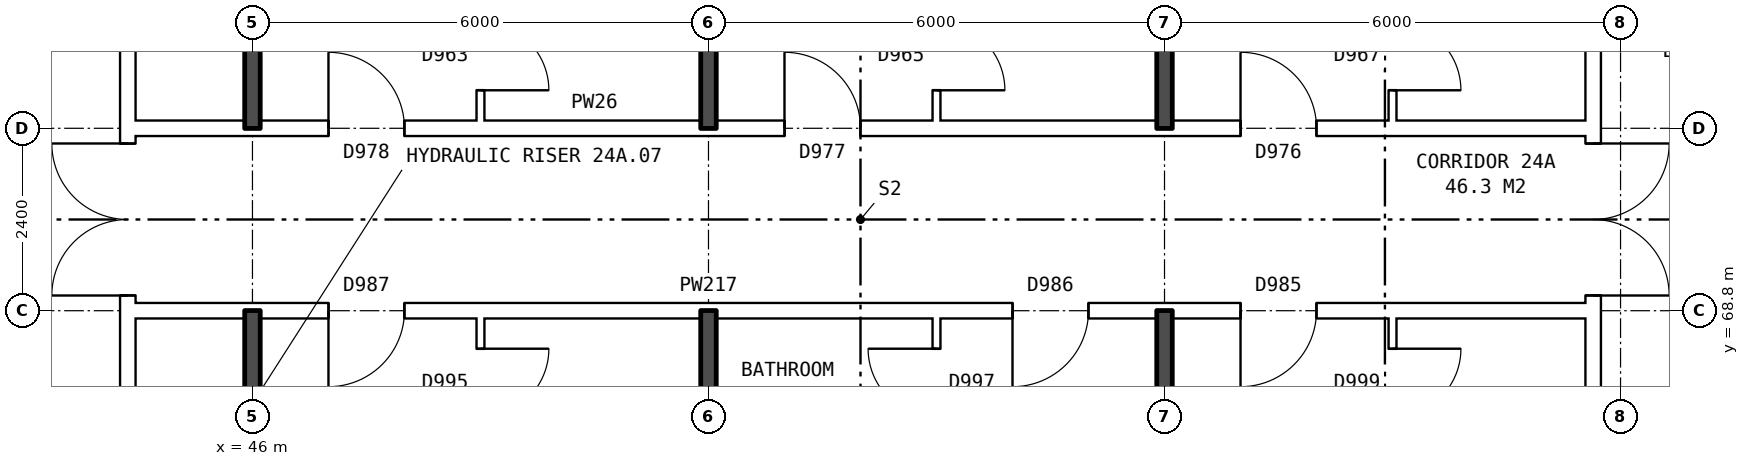
"""IFC4 building model, lengths in metres.
Left out: names, types, materials, properties, quantities, classifications, styles, units other than length and angle.
Written with IfcOpenShell. Run it as: python <this file> out.ifc"""

import sys

from ifc_helpers import new_model, si_unit, direction, frame, frame_2d, origin, place, context, subcontext, project, spatial, rectangle, extrude, element, fill, save


model = new_model("IFC4")
c1 = context("Model", 3, precision=1e-05, world=origin(), true_north=direction((0.0, 1.0)))
c2 = subcontext(c1, "Body", "Model", "MODEL_VIEW")
j1 = project(units=[si_unit("LENGTHUNIT", "METRE"), si_unit("PLANEANGLEUNIT", "RADIAN")], contexts=[c1])
p1 = place(None, origin())
s1 = spatial("IfcSite", under=j1, at=p1, CompositionType="ELEMENT")
p2 = place(p1, origin())
s2 = spatial("IfcBuilding", under=s1, at=p2, CompositionType="ELEMENT")
p3 = place(p2, frame((0.0, 0.0, 87.1)))
s3 = spatial("IfcBuildingStorey", under=s2, at=p3, CompositionType="ELEMENT", Elevation=87.1)
p4 = place(p3, frame((63.64, 63.9, 0.0), z_axis=(0.0, 0.0, 1.0), x_axis=(0.0, 1.0, 0.0)))
e1 = element("IfcWall", 1, at=p4, inside=s3, PredefinedType="PARTITIONING", context=c2, shape_type="SweptSolid", body=[
    extrude(rectangle(XDim=12.2, YDim=0.2, at=frame_2d((6.1, 0.0))), origin(), (0.0, 0.0, 1.0), 2.85),
])
p5 = place(p4, frame((5.1, 0.0, 0.0)))
e2 = element("IfcOpeningElement", 2, at=p5, cuts=e1, PredefinedType="OPENING", context=c2, shape_type="SweptSolid", body=[
    extrude(rectangle(XDim=2.0, YDim=2.1, at=frame_2d((1.0, 1.05))), frame((0.0, 0.11, 0.0), z_axis=(0.0, -1.0, 0.0), x_axis=(1.0, 0.0, 0.0)), (0.0, 0.0, 1.0), 0.22),
])
p6 = place(p3, frame((44.36, 63.9, 0.0), z_axis=(0.0, 0.0, 1.0), x_axis=(0.0, 1.0, 0.0)))
e3 = element("IfcWall", 3, at=p6, inside=s3, PredefinedType="PARTITIONING", context=c2, shape_type="SweptSolid", body=[
    extrude(rectangle(XDim=12.2, YDim=0.2, at=frame_2d((6.1, 0.0))), origin(), (0.0, 0.0, 1.0), 2.85),
])
p7 = place(p6, frame((5.1, 0.0, 0.0)))
e4 = element("IfcOpeningElement", 4, at=p7, cuts=e3, PredefinedType="OPENING", context=c2, shape_type="SweptSolid", body=[
    extrude(rectangle(XDim=2.0, YDim=2.1, at=frame_2d((1.0, 1.05))), frame((0.0, 0.11, 0.0), z_axis=(0.0, -1.0, 0.0), x_axis=(1.0, 0.0, 0.0)), (0.0, 0.0, 1.0), 0.22),
])
p8 = place(p3, frame((44.36, 68.8, 0.0), z_axis=(0.0, 0.0, 1.0), x_axis=(1.0, 0.0, 0.0)))
e5 = element("IfcWall", 5, at=p8, inside=s3, PredefinedType="PARTITIONING", context=c2, shape_type="SweptSolid", body=[
    extrude(rectangle(XDim=19.28, YDim=0.2, at=frame_2d((9.64, 0.0))), origin(), (0.0, 0.0, 1.0), 2.85),
])
p9 = place(p8, frame((14.64, 0.0, 0.0)))
e6 = element("IfcOpeningElement", 6, at=p9, cuts=e5, PredefinedType="OPENING", context=c2, shape_type="SweptSolid", body=[
    extrude(rectangle(XDim=1.0, YDim=2.1, at=frame_2d((0.5, 1.05))), frame((0.0, 0.11, 0.0), z_axis=(0.0, -1.0, 0.0), x_axis=(1.0, 0.0, 0.0)), (0.0, 0.0, 1.0), 0.22),
])
p10 = place(p8, frame((11.64, 0.0, 0.0)))
e7 = element("IfcOpeningElement", 7, at=p10, cuts=e5, PredefinedType="OPENING", context=c2, shape_type="SweptSolid", body=[
    extrude(rectangle(XDim=1.0, YDim=2.1, at=frame_2d((0.5, 1.05))), frame((0.0, 0.11, 0.0), z_axis=(0.0, -1.0, 0.0), x_axis=(1.0, 0.0, 0.0)), (0.0, 0.0, 1.0), 0.22),
])
p11 = place(p8, frame((2.64, 0.0, 0.0)))
e8 = element("IfcOpeningElement", 8, at=p11, cuts=e5, PredefinedType="OPENING", context=c2, shape_type="SweptSolid", body=[
    extrude(rectangle(XDim=1.0, YDim=2.1, at=frame_2d((0.5, 1.05))), frame((0.0, 0.11, 0.0), z_axis=(0.0, -1.0, 0.0), x_axis=(1.0, 0.0, 0.0)), (0.0, 0.0, 1.0), 0.22),
])
p12 = place(p3, frame((44.36, 71.2, 0.0), z_axis=(0.0, 0.0, 1.0), x_axis=(1.0, 0.0, 0.0)))
e9 = element("IfcWall", 9, at=p12, inside=s3, PredefinedType="PARTITIONING", context=c2, shape_type="SweptSolid", body=[
    extrude(rectangle(XDim=19.28, YDim=0.2, at=frame_2d((9.64, 0.0))), origin(), (0.0, 0.0, 1.0), 2.85),
])
p13 = place(p12, frame((14.64, 0.0, 0.0)))
e10 = element("IfcOpeningElement", 10, at=p13, cuts=e9, PredefinedType="OPENING", context=c2, shape_type="SweptSolid", body=[
    extrude(rectangle(XDim=1.0, YDim=2.1, at=frame_2d((0.5, 1.05))), frame((0.0, 0.11, 0.0), z_axis=(0.0, -1.0, 0.0), x_axis=(1.0, 0.0, 0.0)), (0.0, 0.0, 1.0), 0.22),
])
p14 = place(p12, frame((8.64, 0.0, 0.0)))
e11 = element("IfcOpeningElement", 11, at=p14, cuts=e9, PredefinedType="OPENING", context=c2, shape_type="SweptSolid", body=[
    extrude(rectangle(XDim=1.0, YDim=2.1, at=frame_2d((0.5, 1.05))), frame((0.0, 0.11, 0.0), z_axis=(0.0, -1.0, 0.0), x_axis=(1.0, 0.0, 0.0)), (0.0, 0.0, 1.0), 0.22),
])
p15 = place(p12, frame((2.64, 0.0, 0.0)))
e12 = element("IfcOpeningElement", 12, at=p15, cuts=e9, PredefinedType="OPENING", context=c2, shape_type="SweptSolid", body=[
    extrude(rectangle(XDim=1.0, YDim=2.1, at=frame_2d((0.5, 1.05))), frame((0.0, 0.11, 0.0), z_axis=(0.0, -1.0, 0.0), x_axis=(1.0, 0.0, 0.0)), (0.0, 0.0, 1.0), 0.22),
])
for number, where, z_axis, x_axis in (
    (13, (46.0, 63.8, 0.0), (0.0, 0.0, 1.0), (0.0, 1.0, 0.0)),
    (14, (46.0, 71.2, 0.0), (0.0, 0.0, 1.0), (0.0, 1.0, 0.0)),
):
    element("IfcWall", number, at=place(p3, frame(where, z_axis=z_axis, x_axis=x_axis)), inside=s3, PredefinedType="SOLIDWALL", context=c2, shape_type="SweptSolid", body=[
        extrude(rectangle(XDim=5.0, YDim=0.2, at=frame_2d((2.5, 0.0))), origin(), (0.0, 0.0, 1.0), 2.85),
    ])
p16 = place(p3, frame((49.0, 54.36, 0.0), z_axis=(0.0, 0.0, 1.0), x_axis=(0.0, 1.0, 0.0)))
e15 = element("IfcWall", 15, at=p16, inside=s3, PredefinedType="PARTITIONING", context=c2, shape_type="SweptSolid", body=[
    extrude(rectangle(XDim=14.34, YDim=0.1, at=frame_2d((7.17, 0.0))), origin(), (0.0, 0.0, 1.0), 2.85),
])
p17 = place(p16, frame((5.5, 0.0, 0.0)))
e16 = element("IfcOpeningElement", 16, at=p17, cuts=e15, PredefinedType="OPENING", context=c2, shape_type="SweptSolid", body=[
    extrude(rectangle(XDim=0.9, YDim=2.1, at=frame_2d((0.45, 1.05))), frame((0.0, 0.06, 0.0), z_axis=(0.0, -1.0, 0.0), x_axis=(1.0, 0.0, 0.0)), (0.0, 0.0, 1.0), 0.12),
])
p18 = place(p16, frame((13.04, 0.0, 0.0)))
e17 = element("IfcOpeningElement", 17, at=p18, cuts=e15, PredefinedType="OPENING", context=c2, shape_type="SweptSolid", body=[
    extrude(rectangle(XDim=0.9, YDim=2.1, at=frame_2d((0.45, 1.05))), frame((0.0, 0.06, 0.0), z_axis=(0.0, -1.0, 0.0), x_axis=(1.0, 0.0, 0.0)), (0.0, 0.0, 1.0), 0.12),
])
p19 = place(p3, frame((49.0, 71.3, 0.0), z_axis=(0.0, 0.0, 1.0), x_axis=(0.0, 1.0, 0.0)))
e18 = element("IfcWall", 18, at=p19, inside=s3, PredefinedType="PARTITIONING", context=c2, shape_type="SweptSolid", body=[
    extrude(rectangle(XDim=14.34, YDim=0.1, at=frame_2d((7.17, 0.0))), origin(), (0.0, 0.0, 1.0), 2.85),
])
p20 = place(p19, frame((7.94, 0.0, 0.0)))
e19 = element("IfcOpeningElement", 19, at=p20, cuts=e18, PredefinedType="OPENING", context=c2, shape_type="SweptSolid", body=[
    extrude(rectangle(XDim=0.9, YDim=2.1, at=frame_2d((0.45, 1.05))), frame((0.0, 0.06, 0.0), z_axis=(0.0, -1.0, 0.0), x_axis=(1.0, 0.0, 0.0)), (0.0, 0.0, 1.0), 0.12),
])
p21 = place(p19, frame((0.4, 0.0, 0.0)))
e20 = element("IfcOpeningElement", 20, at=p21, cuts=e18, PredefinedType="OPENING", context=c2, shape_type="SweptSolid", body=[
    extrude(rectangle(XDim=0.9, YDim=2.1, at=frame_2d((0.45, 1.05))), frame((0.0, 0.06, 0.0), z_axis=(0.0, -1.0, 0.0), x_axis=(1.0, 0.0, 0.0)), (0.0, 0.0, 1.0), 0.12),
])
for number, where, z_axis, x_axis in (
    (21, (52.0, 54.36, 0.0), (0.0, 0.0, 1.0), (0.0, 1.0, 0.0)),
    (22, (52.0, 71.2, 0.0), (0.0, 0.0, 1.0), (0.0, 1.0, 0.0)),
):
    element("IfcWall", number, at=place(p3, frame(where, z_axis=z_axis, x_axis=x_axis)), inside=s3, PredefinedType="SOLIDWALL", context=c2, shape_type="SweptSolid", body=[
        extrude(rectangle(XDim=14.44, YDim=0.2, at=frame_2d((7.22, 0.0))), origin(), (0.0, 0.0, 1.0), 2.85),
    ])
p22 = place(p3, frame((55.0, 54.36, 0.0), z_axis=(0.0, 0.0, 1.0), x_axis=(0.0, 1.0, 0.0)))
e23 = element("IfcWall", 23, at=p22, inside=s3, PredefinedType="PARTITIONING", context=c2, shape_type="SweptSolid", body=[
    extrude(rectangle(XDim=14.34, YDim=0.1, at=frame_2d((7.17, 0.0))), origin(), (0.0, 0.0, 1.0), 2.85),
])
p23 = place(p22, frame((6.7, 0.0, 0.0)))
e24 = element("IfcOpeningElement", 24, at=p23, cuts=e23, PredefinedType="OPENING", context=c2, shape_type="SweptSolid", body=[
    extrude(rectangle(XDim=0.9, YDim=2.1, at=frame_2d((0.45, 1.05))), frame((0.0, 0.06, 0.0), z_axis=(0.0, -1.0, 0.0), x_axis=(1.0, 0.0, 0.0)), (0.0, 0.0, 1.0), 0.12),
])
p24 = place(p22, frame((13.04, 0.0, 0.0)))
e25 = element("IfcOpeningElement", 25, at=p24, cuts=e23, PredefinedType="OPENING", context=c2, shape_type="SweptSolid", body=[
    extrude(rectangle(XDim=0.9, YDim=2.1, at=frame_2d((0.45, 1.05))), frame((0.0, 0.06, 0.0), z_axis=(0.0, -1.0, 0.0), x_axis=(1.0, 0.0, 0.0)), (0.0, 0.0, 1.0), 0.12),
])
p25 = place(p3, frame((55.0, 71.3, 0.0), z_axis=(0.0, 0.0, 1.0), x_axis=(0.0, 1.0, 0.0)))
e26 = element("IfcWall", 26, at=p25, inside=s3, PredefinedType="PARTITIONING", context=c2, shape_type="SweptSolid", body=[
    extrude(rectangle(XDim=14.34, YDim=0.1, at=frame_2d((7.17, 0.0))), origin(), (0.0, 0.0, 1.0), 2.85),
])
p26 = place(p25, frame((6.74, 0.0, 0.0)))
e27 = element("IfcOpeningElement", 27, at=p26, cuts=e26, PredefinedType="OPENING", context=c2, shape_type="SweptSolid", body=[
    extrude(rectangle(XDim=0.9, YDim=2.1, at=frame_2d((0.45, 1.05))), frame((0.0, 0.06, 0.0), z_axis=(0.0, -1.0, 0.0), x_axis=(1.0, 0.0, 0.0)), (0.0, 0.0, 1.0), 0.12),
])
p27 = place(p25, frame((0.4, 0.0, 0.0)))
e28 = element("IfcOpeningElement", 28, at=p27, cuts=e26, PredefinedType="OPENING", context=c2, shape_type="SweptSolid", body=[
    extrude(rectangle(XDim=0.9, YDim=2.1, at=frame_2d((0.45, 1.05))), frame((0.0, 0.06, 0.0), z_axis=(0.0, -1.0, 0.0), x_axis=(1.0, 0.0, 0.0)), (0.0, 0.0, 1.0), 0.12),
])
for number, where, z_axis, x_axis in (
    (29, (58.0, 54.36, 0.0), (0.0, 0.0, 1.0), (0.0, 1.0, 0.0)),
    (30, (58.0, 71.2, 0.0), (0.0, 0.0, 1.0), (0.0, 1.0, 0.0)),
):
    element("IfcWall", number, at=place(p3, frame(where, z_axis=z_axis, x_axis=x_axis)), inside=s3, PredefinedType="SOLIDWALL", context=c2, shape_type="SweptSolid", body=[
        extrude(rectangle(XDim=14.44, YDim=0.2, at=frame_2d((7.22, 0.0))), origin(), (0.0, 0.0, 1.0), 2.85),
    ])
p28 = place(p3, frame((61.0, 54.36, 0.0), z_axis=(0.0, 0.0, 1.0), x_axis=(0.0, 1.0, 0.0)))
e31 = element("IfcWall", 31, at=p28, inside=s3, PredefinedType="PARTITIONING", context=c2, shape_type="SweptSolid", body=[
    extrude(rectangle(XDim=14.34, YDim=0.1, at=frame_2d((7.17, 0.0))), origin(), (0.0, 0.0, 1.0), 2.85),
])
p29 = place(p28, frame((7.7, 0.0, 0.0)))
e32 = element("IfcOpeningElement", 32, at=p29, cuts=e31, PredefinedType="OPENING", context=c2, shape_type="SweptSolid", body=[
    extrude(rectangle(XDim=0.9, YDim=2.1, at=frame_2d((0.45, 1.05))), frame((0.0, 0.06, 0.0), z_axis=(0.0, -1.0, 0.0), x_axis=(1.0, 0.0, 0.0)), (0.0, 0.0, 1.0), 0.12),
])
p30 = place(p28, frame((13.04, 0.0, 0.0)))
e33 = element("IfcOpeningElement", 33, at=p30, cuts=e31, PredefinedType="OPENING", context=c2, shape_type="SweptSolid", body=[
    extrude(rectangle(XDim=0.9, YDim=2.1, at=frame_2d((0.45, 1.05))), frame((0.0, 0.06, 0.0), z_axis=(0.0, -1.0, 0.0), x_axis=(1.0, 0.0, 0.0)), (0.0, 0.0, 1.0), 0.12),
])
p31 = place(p3, frame((61.0, 71.3, 0.0), z_axis=(0.0, 0.0, 1.0), x_axis=(0.0, 1.0, 0.0)))
e34 = element("IfcWall", 34, at=p31, inside=s3, PredefinedType="PARTITIONING", context=c2, shape_type="SweptSolid", body=[
    extrude(rectangle(XDim=14.34, YDim=0.1, at=frame_2d((7.17, 0.0))), origin(), (0.0, 0.0, 1.0), 2.85),
])
p32 = place(p31, frame((7.94, 0.0, 0.0)))
e35 = element("IfcOpeningElement", 35, at=p32, cuts=e34, PredefinedType="OPENING", context=c2, shape_type="SweptSolid", body=[
    extrude(rectangle(XDim=0.9, YDim=2.1, at=frame_2d((0.45, 1.05))), frame((0.0, 0.06, 0.0), z_axis=(0.0, -1.0, 0.0), x_axis=(1.0, 0.0, 0.0)), (0.0, 0.0, 1.0), 0.12),
])
p33 = place(p31, frame((0.4, 0.0, 0.0)))
e36 = element("IfcOpeningElement", 36, at=p33, cuts=e34, PredefinedType="OPENING", context=c2, shape_type="SweptSolid", body=[
    extrude(rectangle(XDim=0.9, YDim=2.1, at=frame_2d((0.45, 1.05))), frame((0.0, 0.06, 0.0), z_axis=(0.0, -1.0, 0.0), x_axis=(1.0, 0.0, 0.0)), (0.0, 0.0, 1.0), 0.12),
])
p34 = place(p5, frame((2.0, 0.0, 0.0), z_axis=(0.0, 0.0, 1.0), x_axis=(-1.0, 0.0, 0.0)))
e37 = element("IfcDoor", 37, at=p34, inside=s3, OperationType="DOUBLE_DOOR_SINGLE_SWING", PredefinedType="DOOR", context=c2, shape_type="SweptSolid", body=[
    extrude(rectangle(XDim=2.0, YDim=2.1, at=frame_2d((1.0, 1.05))), frame((0.0, 0.025, 0.0), z_axis=(0.0, -1.0, 0.0), x_axis=(1.0, 0.0, 0.0)), (0.0, 0.0, 1.0), 0.05),
])
fill(e2, e37)
p35 = place(p7, origin())
e38 = element("IfcDoor", 38, at=p35, inside=s3, OperationType="DOUBLE_DOOR_SINGLE_SWING", PredefinedType="DOOR", context=c2, shape_type="SweptSolid", body=[
    extrude(rectangle(XDim=2.0, YDim=2.1, at=frame_2d((1.0, 1.05))), frame((0.0, 0.025, 0.0), z_axis=(0.0, -1.0, 0.0), x_axis=(1.0, 0.0, 0.0)), (0.0, 0.0, 1.0), 0.05),
])
fill(e4, e38)
p36 = place(p9, frame((1.0, 0.0, 0.0), z_axis=(0.0, 0.0, 1.0), x_axis=(-1.0, 0.0, 0.0)))
e39 = element("IfcDoor", 39, at=p36, inside=s3, OperationType="SINGLE_SWING_RIGHT", PredefinedType="DOOR", context=c2, shape_type="SweptSolid", body=[
    extrude(rectangle(XDim=1.0, YDim=2.1, at=frame_2d((0.5, 1.05))), frame((0.0, 0.025, 0.0), z_axis=(0.0, -1.0, 0.0), x_axis=(1.0, 0.0, 0.0)), (0.0, 0.0, 1.0), 0.05),
])
fill(e6, e39)
p37 = place(p30, frame((0.9, 0.0, 0.0), z_axis=(0.0, 0.0, 1.0), x_axis=(-1.0, 0.0, 0.0)))
e40 = element("IfcDoor", 40, at=p37, inside=s3, OperationType="SINGLE_SWING_LEFT", PredefinedType="DOOR", context=c2, shape_type="SweptSolid", body=[
    extrude(rectangle(XDim=0.9, YDim=2.1, at=frame_2d((0.45, 1.05))), frame((0.0, 0.025, 0.0), z_axis=(0.0, -1.0, 0.0), x_axis=(1.0, 0.0, 0.0)), (0.0, 0.0, 1.0), 0.05),
])
fill(e33, e40)
p38 = place(p10, frame((1.0, 0.0, 0.0), z_axis=(0.0, 0.0, 1.0), x_axis=(-1.0, 0.0, 0.0)))
e41 = element("IfcDoor", 41, at=p38, inside=s3, OperationType="SINGLE_SWING_RIGHT", PredefinedType="DOOR", context=c2, shape_type="SweptSolid", body=[
    extrude(rectangle(XDim=1.0, YDim=2.1, at=frame_2d((0.5, 1.05))), frame((0.0, 0.025, 0.0), z_axis=(0.0, -1.0, 0.0), x_axis=(1.0, 0.0, 0.0)), (0.0, 0.0, 1.0), 0.05),
])
fill(e7, e41)
p39 = place(p24, origin())
e42 = element("IfcDoor", 42, at=p39, inside=s3, OperationType="SINGLE_SWING_RIGHT", PredefinedType="DOOR", context=c2, shape_type="SweptSolid", body=[
    extrude(rectangle(XDim=0.9, YDim=2.1, at=frame_2d((0.45, 1.05))), frame((0.0, 0.025, 0.0), z_axis=(0.0, -1.0, 0.0), x_axis=(1.0, 0.0, 0.0)), (0.0, 0.0, 1.0), 0.05),
])
fill(e25, e42)
p40 = place(p11, frame((1.0, 0.0, 0.0), z_axis=(0.0, 0.0, 1.0), x_axis=(-1.0, 0.0, 0.0)))
e43 = element("IfcDoor", 43, at=p40, inside=s3, OperationType="SINGLE_SWING_RIGHT", PredefinedType="DOOR", context=c2, shape_type="SweptSolid", body=[
    extrude(rectangle(XDim=1.0, YDim=2.1, at=frame_2d((0.5, 1.05))), frame((0.0, 0.025, 0.0), z_axis=(0.0, -1.0, 0.0), x_axis=(1.0, 0.0, 0.0)), (0.0, 0.0, 1.0), 0.05),
])
fill(e8, e43)
p41 = place(p18, frame((0.9, 0.0, 0.0), z_axis=(0.0, 0.0, 1.0), x_axis=(-1.0, 0.0, 0.0)))
e44 = element("IfcDoor", 44, at=p41, inside=s3, OperationType="SINGLE_SWING_LEFT", PredefinedType="DOOR", context=c2, shape_type="SweptSolid", body=[
    extrude(rectangle(XDim=0.9, YDim=2.1, at=frame_2d((0.45, 1.05))), frame((0.0, 0.025, 0.0), z_axis=(0.0, -1.0, 0.0), x_axis=(1.0, 0.0, 0.0)), (0.0, 0.0, 1.0), 0.05),
])
fill(e17, e44)
p42 = place(p13, origin())
e45 = element("IfcDoor", 45, at=p42, inside=s3, OperationType="SINGLE_SWING_LEFT", PredefinedType="DOOR", context=c2, shape_type="SweptSolid", body=[
    extrude(rectangle(XDim=1.0, YDim=2.1, at=frame_2d((0.5, 1.05))), frame((0.0, 0.025, 0.0), z_axis=(0.0, -1.0, 0.0), x_axis=(1.0, 0.0, 0.0)), (0.0, 0.0, 1.0), 0.05),
])
fill(e10, e45)
p43 = place(p33, frame((0.9, 0.0, 0.0), z_axis=(0.0, 0.0, 1.0), x_axis=(-1.0, 0.0, 0.0)))
e46 = element("IfcDoor", 46, at=p43, inside=s3, OperationType="SINGLE_SWING_RIGHT", PredefinedType="DOOR", context=c2, shape_type="SweptSolid", body=[
    extrude(rectangle(XDim=0.9, YDim=2.1, at=frame_2d((0.45, 1.05))), frame((0.0, 0.025, 0.0), z_axis=(0.0, -1.0, 0.0), x_axis=(1.0, 0.0, 0.0)), (0.0, 0.0, 1.0), 0.05),
])
fill(e36, e46)
p44 = place(p14, origin())
e47 = element("IfcDoor", 47, at=p44, inside=s3, OperationType="SINGLE_SWING_LEFT", PredefinedType="DOOR", context=c2, shape_type="SweptSolid", body=[
    extrude(rectangle(XDim=1.0, YDim=2.1, at=frame_2d((0.5, 1.05))), frame((0.0, 0.025, 0.0), z_axis=(0.0, -1.0, 0.0), x_axis=(1.0, 0.0, 0.0)), (0.0, 0.0, 1.0), 0.05),
])
fill(e11, e47)
p45 = place(p27, frame((0.9, 0.0, 0.0), z_axis=(0.0, 0.0, 1.0), x_axis=(-1.0, 0.0, 0.0)))
e48 = element("IfcDoor", 48, at=p45, inside=s3, OperationType="SINGLE_SWING_RIGHT", PredefinedType="DOOR", context=c2, shape_type="SweptSolid", body=[
    extrude(rectangle(XDim=0.9, YDim=2.1, at=frame_2d((0.45, 1.05))), frame((0.0, 0.025, 0.0), z_axis=(0.0, -1.0, 0.0), x_axis=(1.0, 0.0, 0.0)), (0.0, 0.0, 1.0), 0.05),
])
fill(e28, e48)
p46 = place(p15, origin())
e49 = element("IfcDoor", 49, at=p46, inside=s3, OperationType="SINGLE_SWING_LEFT", PredefinedType="DOOR", context=c2, shape_type="SweptSolid", body=[
    extrude(rectangle(XDim=1.0, YDim=2.1, at=frame_2d((0.5, 1.05))), frame((0.0, 0.025, 0.0), z_axis=(0.0, -1.0, 0.0), x_axis=(1.0, 0.0, 0.0)), (0.0, 0.0, 1.0), 0.05),
])
fill(e12, e49)
p47 = place(p21, frame((0.9, 0.0, 0.0), z_axis=(0.0, 0.0, 1.0), x_axis=(-1.0, 0.0, 0.0)))
e50 = element("IfcDoor", 50, at=p47, inside=s3, OperationType="SINGLE_SWING_RIGHT", PredefinedType="DOOR", context=c2, shape_type="SweptSolid", body=[
    extrude(rectangle(XDim=0.9, YDim=2.1, at=frame_2d((0.45, 1.05))), frame((0.0, 0.025, 0.0), z_axis=(0.0, -1.0, 0.0), x_axis=(1.0, 0.0, 0.0)), (0.0, 0.0, 1.0), 0.05),
])
fill(e20, e50)
save(model, sys.argv[1])
